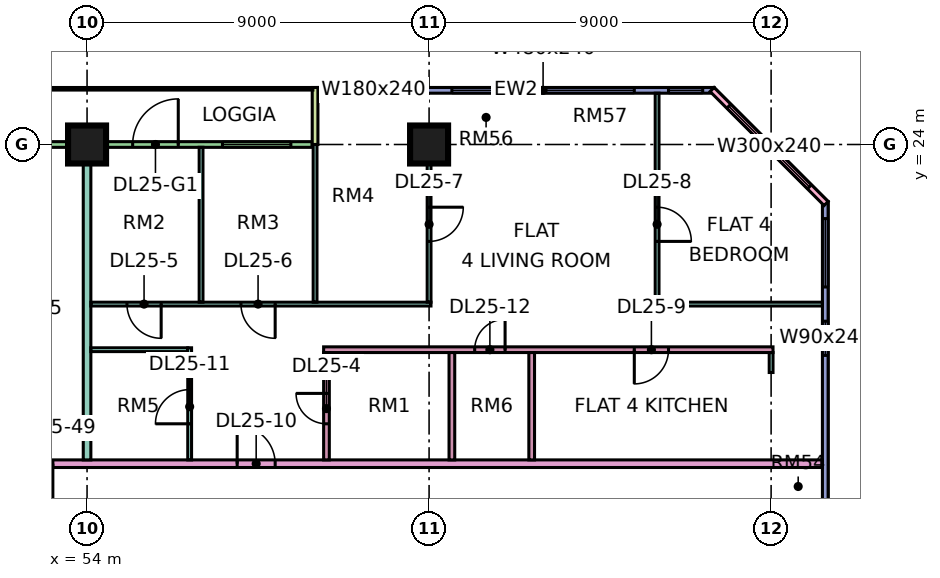
"""IFC4 building model, lengths in metres.
Left out: names, types, materials, properties, quantities, classifications, styles, units other than length and angle.
Written with IfcOpenShell. Run it as: python <this file> out.ifc"""

import sys

from ifc_helpers import new_model, si_unit, direction, frame, frame_2d, origin, origin_2d, place, context, subcontext, project, spatial, rectangle, extrude, element, fill, save


model = new_model("IFC4")
c1 = context("Model", 3, precision=1e-05, world=origin(), true_north=direction((0.0, 1.0)))
c2 = subcontext(c1, "Body", "Model", "MODEL_VIEW")
j1 = project(units=[si_unit("LENGTHUNIT", "METRE"), si_unit("PLANEANGLEUNIT", "RADIAN")], contexts=[c1])
p1 = place(None, origin())
s1 = spatial("IfcSite", under=j1, at=p1, CompositionType="ELEMENT")
p2 = place(p1, origin())
s2 = spatial("IfcBuilding", under=s1, at=p2, CompositionType="ELEMENT")
p3 = place(p2, frame((0.0, 0.0, 110.65)))
s3 = spatial("IfcBuildingStorey", under=s2, at=p3, CompositionType="ELEMENT", Elevation=110.65)
for number, where, z_axis, x_axis in (
    (1, (54.0, 24.0, 0.0), (0.0, 0.0, 1.0), (1.0, 0.0, 0.0)),
    (2, (63.0, 24.0, 0.0), (0.0, 0.0, 1.0), (1.0, 0.0, 0.0)),
):
    element("IfcColumn", number, at=place(p3, frame(where, z_axis=z_axis, x_axis=x_axis)), inside=s3, PredefinedType="COLUMN", context=c2, shape_type="SweptSolid", body=[
        extrude(rectangle(XDim=1.0, YDim=1.0, at=origin_2d()), origin(), (0.0, 0.0, 1.0), 3.75),
    ])
p4 = place(p3, frame((70.5, 25.425, 0.0), z_axis=(0.0, 0.0, 1.0), x_axis=(-1.0, 0.0, 0.0)))
e3 = element("IfcWall", 3, at=p4, inside=s3, PredefinedType="SOLIDWALL", context=c2, shape_type="SweptSolid", body=[
    extrude(rectangle(XDim=10.425, YDim=0.15, at=frame_2d((5.212, 0.0))), origin(), (0.0, 0.0, 1.0), 3.35),
])
p5 = place(p4, frame((0.3, 0.0, 0.45)))
e4 = element("IfcOpeningElement", 4, at=p5, cuts=e3, PredefinedType="OPENING", context=c2, shape_type="SweptSolid", body=[
    extrude(rectangle(XDim=0.9, YDim=2.4, at=frame_2d((0.45, 1.2))), frame((0.0, 0.085, 0.0), z_axis=(0.0, -1.0, 0.0), x_axis=(1.0, 0.0, 0.0)), (0.0, 0.0, 1.0), 0.17),
])
p6 = place(p4, frame((2.1, 0.0, 0.45)))
e5 = element("IfcOpeningElement", 5, at=p6, cuts=e3, PredefinedType="OPENING", context=c2, shape_type="SweptSolid", body=[
    extrude(rectangle(XDim=4.8, YDim=2.4, at=frame_2d((2.4, 1.2))), frame((0.0, 0.085, 0.0), z_axis=(0.0, -1.0, 0.0), x_axis=(1.0, 0.0, 0.0)), (0.0, 0.0, 1.0), 0.17),
])
p7 = place(p4, frame((8.062, 0.0, 0.45)))
e6 = element("IfcOpeningElement", 6, at=p7, cuts=e3, PredefinedType="OPENING", context=c2, shape_type="SweptSolid", body=[
    extrude(rectangle(XDim=1.8, YDim=2.4, at=frame_2d((0.9, 1.2))), frame((0.0, 0.085, 0.0), z_axis=(0.0, -1.0, 0.0), x_axis=(1.0, 0.0, 0.0)), (0.0, 0.0, 1.0), 0.17),
])
p8 = place(p3, frame((59.925, 24.0, 0.0), z_axis=(0.0, 0.0, 1.0), x_axis=(-1.0, 0.0, 0.0)))
e7 = element("IfcWall", 7, at=p8, inside=s3, PredefinedType="SOLIDWALL", context=c2, shape_type="SweptSolid", body=[
    extrude(rectangle(XDim=11.85, YDim=0.15, at=frame_2d((5.925, 0.0))), origin(), (0.0, 0.0, 1.0), 3.35),
])
p9 = place(p8, frame((0.562, 0.0, 0.45)))
e8 = element("IfcOpeningElement", 8, at=p9, cuts=e7, PredefinedType="OPENING", context=c2, shape_type="SweptSolid", body=[
    extrude(rectangle(XDim=1.8, YDim=2.4, at=frame_2d((0.9, 1.2))), frame((0.0, 0.085, 0.0), z_axis=(0.0, -1.0, 0.0), x_axis=(1.0, 0.0, 0.0)), (0.0, 0.0, 1.0), 0.17),
])
p10 = place(p8, frame((3.525, 0.0, 0.0)))
e9 = element("IfcOpeningElement", 9, at=p10, cuts=e7, PredefinedType="OPENING", context=c2, shape_type="SweptSolid", body=[
    extrude(rectangle(XDim=1.2, YDim=2.4, at=frame_2d((0.6, 1.2))), frame((0.0, 0.085, 0.0), z_axis=(0.0, -1.0, 0.0), x_axis=(1.0, 0.0, 0.0)), (0.0, 0.0, 1.0), 0.17),
])
p11 = place(p8, frame((7.087, 0.0, 0.45)))
e10 = element("IfcOpeningElement", 10, at=p11, cuts=e7, PredefinedType="OPENING", context=c2, shape_type="SweptSolid", body=[
    extrude(rectangle(XDim=4.2, YDim=2.4, at=frame_2d((2.1, 1.2))), frame((0.0, 0.085, 0.0), z_axis=(0.0, -1.0, 0.0), x_axis=(1.0, 0.0, 0.0)), (0.0, 0.0, 1.0), 0.17),
])
p12 = place(p3, frame((60.0, 25.5, 0.0), z_axis=(0.0, 0.0, 1.0), x_axis=(0.0, -1.0, 0.0)))
e11 = element("IfcWall", 11, at=p12, inside=s3, PredefinedType="SOLIDWALL", context=c2, shape_type="SweptSolid", body=[
    extrude(rectangle(XDim=1.5, YDim=0.15, at=frame_2d((0.75, 0.0))), origin(), (0.0, 0.0, 1.0), 3.35),
])
p13 = place(p3, frame((73.425, 12.075, 0.0), z_axis=(0.0, 0.0, 1.0), x_axis=(0.0, 1.0, 0.0)))
e12 = element("IfcWall", 12, at=p13, inside=s3, PredefinedType="SOLIDWALL", context=c2, shape_type="SweptSolid", body=[
    extrude(rectangle(XDim=10.425, YDim=0.15, at=frame_2d((5.212, 0.0))), origin(), (0.0, 0.0, 1.0), 3.35),
])
p14 = place(p13, frame((6.375, 0.0, 0.45)))
e13 = element("IfcOpeningElement", 13, at=p14, cuts=e12, PredefinedType="OPENING", context=c2, shape_type="SweptSolid", body=[
    extrude(rectangle(XDim=0.9, YDim=2.4, at=frame_2d((0.45, 1.2))), frame((0.0, 0.085, 0.0), z_axis=(0.0, -1.0, 0.0), x_axis=(1.0, 0.0, 0.0)), (0.0, 0.0, 1.0), 0.17),
])
p15 = place(p13, frame((8.175, 0.0, 0.45)))
e14 = element("IfcOpeningElement", 14, at=p15, cuts=e12, PredefinedType="OPENING", context=c2, shape_type="SweptSolid", body=[
    extrude(rectangle(XDim=1.8, YDim=2.4, at=frame_2d((0.9, 1.2))), frame((0.0, 0.085, 0.0), z_axis=(0.0, -1.0, 0.0), x_axis=(1.0, 0.0, 0.0)), (0.0, 0.0, 1.0), 0.17),
])
p16 = place(p3, frame((73.447, 22.447, 0.0), z_axis=(0.0, 0.0, 1.0), x_axis=(-0.707106781187, 0.707106781187, 0.0)))
e15 = element("IfcWall", 15, at=p16, inside=s3, PredefinedType="SOLIDWALL", context=c2, shape_type="SweptSolid", body=[
    extrude(rectangle(XDim=4.243, YDim=0.15, at=frame_2d((2.121, 0.0))), origin(), (0.0, 0.0, 1.0), 3.35),
])
p17 = place(p16, frame((0.621, 0.0, 0.45)))
e16 = element("IfcOpeningElement", 16, at=p17, cuts=e15, PredefinedType="OPENING", context=c2, shape_type="SweptSolid", body=[
    extrude(rectangle(XDim=3.0, YDim=2.4, at=frame_2d((1.5, 1.2))), frame((0.0, 0.085, 0.0), z_axis=(0.0, -1.0, 0.0), x_axis=(1.0, 0.0, 0.0)), (0.0, 0.0, 1.0), 0.17),
])
p18 = place(p3, frame((51.225, 15.6, 0.0), z_axis=(0.0, 0.0, 1.0), x_axis=(1.0, 0.0, 0.0)))
e17 = element("IfcWall", 17, at=p18, inside=s3, PredefinedType="PARTITIONING", context=c2, shape_type="SweptSolid", body=[
    extrude(rectangle(XDim=22.125, YDim=0.2, at=frame_2d((11.062, 0.0))), origin(), (0.0, 0.0, 1.0), 3.35),
])
p19 = place(p18, frame((6.725, 0.0, 0.0)))
e18 = element("IfcOpeningElement", 18, at=p19, cuts=e17, PredefinedType="OPENING", context=c2, shape_type="SweptSolid", body=[
    extrude(rectangle(XDim=1.0, YDim=2.1, at=frame_2d((0.5, 1.05))), frame((0.0, 0.11, 0.0), z_axis=(0.0, -1.0, 0.0), x_axis=(1.0, 0.0, 0.0)), (0.0, 0.0, 1.0), 0.22),
])
p20 = place(p18, frame((0.875, 0.0, 0.0)))
e19 = element("IfcOpeningElement", 19, at=p20, cuts=e17, PredefinedType="OPENING", context=c2, shape_type="SweptSolid", body=[
    extrude(rectangle(XDim=1.0, YDim=2.1, at=frame_2d((0.5, 1.05))), frame((0.0, 0.11, 0.0), z_axis=(0.0, -1.0, 0.0), x_axis=(1.0, 0.0, 0.0)), (0.0, 0.0, 1.0), 0.22),
])
p21 = place(p3, frame((54.0, 15.7, 0.0), z_axis=(0.0, 0.0, 1.0), x_axis=(0.0, 1.0, 0.0)))
e20 = element("IfcWall", 20, at=p21, inside=s3, PredefinedType="PARTITIONING", context=c2, shape_type="SweptSolid", body=[
    extrude(rectangle(XDim=8.226, YDim=0.2, at=frame_2d((4.113, 0.0))), origin(), (0.0, 0.0, 1.0), 3.35),
])
p22 = place(p3, frame((54.1, 18.6, 0.0), z_axis=(0.0, 0.0, 1.0), x_axis=(1.0, 0.0, 0.0)))
e21 = element("IfcWall", 21, at=p22, inside=s3, PredefinedType="PARTITIONING", context=c2, shape_type="SweptSolid", body=[
    extrude(rectangle(XDim=2.55, YDim=0.1, at=frame_2d((1.275, 0.0))), origin(), (0.0, 0.0, 1.0), 3.35),
])
p23 = place(p3, frame((54.1, 19.8, 0.0), z_axis=(0.0, 0.0, 1.0), x_axis=(1.0, 0.0, 0.0)))
e22 = element("IfcWall", 22, at=p23, inside=s3, PredefinedType="PARTITIONING", context=c2, shape_type="SweptSolid", body=[
    extrude(rectangle(XDim=8.95, YDim=0.1, at=frame_2d((4.475, 0.0))), origin(), (0.0, 0.0, 1.0), 3.35),
])
p24 = place(p23, frame((0.95, 0.0, 0.0)))
e23 = element("IfcOpeningElement", 23, at=p24, cuts=e22, PredefinedType="OPENING", context=c2, shape_type="SweptSolid", body=[
    extrude(rectangle(XDim=0.9, YDim=2.1, at=frame_2d((0.45, 1.05))), frame((0.0, 0.06, 0.0), z_axis=(0.0, -1.0, 0.0), x_axis=(1.0, 0.0, 0.0)), (0.0, 0.0, 1.0), 0.12),
])
p25 = place(p23, frame((3.95, 0.0, 0.0)))
e24 = element("IfcOpeningElement", 24, at=p25, cuts=e22, PredefinedType="OPENING", context=c2, shape_type="SweptSolid", body=[
    extrude(rectangle(XDim=0.9, YDim=2.1, at=frame_2d((0.45, 1.05))), frame((0.0, 0.06, 0.0), z_axis=(0.0, -1.0, 0.0), x_axis=(1.0, 0.0, 0.0)), (0.0, 0.0, 1.0), 0.12),
])
p26 = place(p3, frame((56.7, 15.7, 0.0), z_axis=(0.0, 0.0, 1.0), x_axis=(0.0, 1.0, 0.0)))
e25 = element("IfcWall", 25, at=p26, inside=s3, PredefinedType="PARTITIONING", context=c2, shape_type="SweptSolid", body=[
    extrude(rectangle(XDim=2.95, YDim=0.1, at=frame_2d((1.475, 0.0))), origin(), (0.0, 0.0, 1.0), 3.35),
])
p27 = place(p26, frame((0.95, 0.0, 0.0)))
e26 = element("IfcOpeningElement", 26, at=p27, cuts=e25, PredefinedType="OPENING", context=c2, shape_type="SweptSolid", body=[
    extrude(rectangle(XDim=0.9, YDim=2.1, at=frame_2d((0.45, 1.05))), frame((0.0, 0.06, 0.0), z_axis=(0.0, -1.0, 0.0), x_axis=(1.0, 0.0, 0.0)), (0.0, 0.0, 1.0), 0.12),
])
p28 = place(p3, frame((57.0, 19.85, 0.0), z_axis=(0.0, 0.0, 1.0), x_axis=(0.0, 1.0, 0.0)))
e27 = element("IfcWall", 27, at=p28, inside=s3, PredefinedType="PARTITIONING", context=c2, shape_type="SweptSolid", body=[
    extrude(rectangle(XDim=4.076, YDim=0.1, at=frame_2d((2.038, 0.0))), origin(), (0.0, 0.0, 1.0), 3.35),
])
p29 = place(p3, frame((60.0, 19.85, 0.0), z_axis=(0.0, 0.0, 1.0), x_axis=(0.0, 1.0, 0.0)))
e28 = element("IfcWall", 28, at=p29, inside=s3, PredefinedType="PARTITIONING", context=c2, shape_type="SweptSolid", body=[
    extrude(rectangle(XDim=4.15, YDim=0.1, at=frame_2d((2.075, 0.0))), origin(), (0.0, 0.0, 1.0), 3.35),
])
p30 = place(p3, frame((60.225, 18.6, 0.0), z_axis=(0.0, 0.0, 1.0), x_axis=(1.0, 0.0, 0.0)))
e29 = element("IfcWall", 29, at=p30, inside=s3, PredefinedType="PARTITIONING", context=c2, shape_type="SweptSolid", body=[
    extrude(rectangle(XDim=11.825, YDim=0.15, at=frame_2d((5.913, 0.0))), origin(), (0.0, 0.0, 1.0), 3.35),
])
p31 = place(p30, frame((8.175, 0.0, 0.0)))
e30 = element("IfcOpeningElement", 30, at=p31, cuts=e29, PredefinedType="OPENING", context=c2, shape_type="SweptSolid", body=[
    extrude(rectangle(XDim=0.9, YDim=2.1, at=frame_2d((0.45, 1.05))), frame((0.0, 0.085, 0.0), z_axis=(0.0, -1.0, 0.0), x_axis=(1.0, 0.0, 0.0)), (0.0, 0.0, 1.0), 0.17),
])
p32 = place(p30, frame((3.975, 0.0, 0.0)))
e31 = element("IfcOpeningElement", 31, at=p32, cuts=e29, PredefinedType="OPENING", context=c2, shape_type="SweptSolid", body=[
    extrude(rectangle(XDim=0.8, YDim=2.1, at=frame_2d((0.4, 1.05))), frame((0.0, 0.085, 0.0), z_axis=(0.0, -1.0, 0.0), x_axis=(1.0, 0.0, 0.0)), (0.0, 0.0, 1.0), 0.17),
])
p33 = place(p3, frame((60.3, 15.7, 0.0), z_axis=(0.0, 0.0, 1.0), x_axis=(0.0, 1.0, 0.0)))
e32 = element("IfcWall", 32, at=p33, inside=s3, PredefinedType="PARTITIONING", context=c2, shape_type="SweptSolid", body=[
    extrude(rectangle(XDim=2.825, YDim=0.15, at=frame_2d((1.413, 0.0))), origin(), (0.0, 0.0, 1.0), 3.35),
])
p34 = place(p33, frame((0.95, 0.0, 0.0)))
e33 = element("IfcOpeningElement", 33, at=p34, cuts=e32, PredefinedType="OPENING", context=c2, shape_type="SweptSolid", body=[
    extrude(rectangle(XDim=0.8, YDim=2.1, at=frame_2d((0.4, 1.05))), frame((0.0, 0.085, 0.0), z_axis=(0.0, -1.0, 0.0), x_axis=(1.0, 0.0, 0.0)), (0.0, 0.0, 1.0), 0.17),
])
p35 = place(p3, frame((63.0, 19.85, 0.0), z_axis=(0.0, 0.0, 1.0), x_axis=(0.0, 1.0, 0.0)))
e34 = element("IfcWall", 34, at=p35, inside=s3, PredefinedType="PARTITIONING", context=c2, shape_type="SweptSolid", body=[
    extrude(rectangle(XDim=4.15, YDim=0.1, at=frame_2d((2.075, 0.0))), origin(), (0.0, 0.0, 1.0), 3.35),
])
p36 = place(p35, frame((1.6, 0.0, 0.0)))
e35 = element("IfcOpeningElement", 35, at=p36, cuts=e34, PredefinedType="OPENING", context=c2, shape_type="SweptSolid", body=[
    extrude(rectangle(XDim=0.9, YDim=2.1, at=frame_2d((0.45, 1.05))), frame((0.0, 0.06, 0.0), z_axis=(0.0, -1.0, 0.0), x_axis=(1.0, 0.0, 0.0)), (0.0, 0.0, 1.0), 0.12),
])
for number, where, z_axis, x_axis in (
    (36, (63.6, 15.7, 0.0), (0.0, 0.0, 1.0), (0.0, 1.0, 0.0)),
    (37, (65.7, 15.7, 0.0), (0.0, 0.0, 1.0), (0.0, 1.0, 0.0)),
):
    element("IfcWall", number, at=place(p3, frame(where, z_axis=z_axis, x_axis=x_axis)), inside=s3, PredefinedType="PARTITIONING", context=c2, shape_type="SweptSolid", body=[
        extrude(rectangle(XDim=2.825, YDim=0.15, at=frame_2d((1.413, 0.0))), origin(), (0.0, 0.0, 1.0), 3.35),
    ])
p37 = place(p3, frame((68.95, 19.8, 0.0), z_axis=(0.0, 0.0, 1.0), x_axis=(1.0, 0.0, 0.0)))
e38 = element("IfcWall", 38, at=p37, inside=s3, PredefinedType="PARTITIONING", context=c2, shape_type="SweptSolid", body=[
    extrude(rectangle(XDim=4.401, YDim=0.1, at=frame_2d((2.201, 0.0))), origin(), (0.0, 0.0, 1.0), 3.35),
])
p38 = place(p3, frame((69.0, 19.85, 0.0), z_axis=(0.0, 0.0, 1.0), x_axis=(0.0, 1.0, 0.0)))
e39 = element("IfcWall", 39, at=p38, inside=s3, PredefinedType="PARTITIONING", context=c2, shape_type="SweptSolid", body=[
    extrude(rectangle(XDim=5.5, YDim=0.1, at=frame_2d((2.75, 0.0))), origin(), (0.0, 0.0, 1.0), 3.35),
])
p39 = place(p38, frame((1.6, 0.0, 0.0)))
e40 = element("IfcOpeningElement", 40, at=p39, cuts=e39, PredefinedType="OPENING", context=c2, shape_type="SweptSolid", body=[
    extrude(rectangle(XDim=0.9, YDim=2.1, at=frame_2d((0.45, 1.05))), frame((0.0, 0.06, 0.0), z_axis=(0.0, -1.0, 0.0), x_axis=(1.0, 0.0, 0.0)), (0.0, 0.0, 1.0), 0.12),
])
p40 = place(p3, frame((72.0, 18.0, 0.0), z_axis=(0.0, 0.0, 1.0), x_axis=(0.0, 1.0, 0.0)))
e41 = element("IfcWall", 41, at=p40, inside=s3, PredefinedType="PARTITIONING", context=c2, shape_type="SweptSolid", body=[
    extrude(rectangle(XDim=0.525, YDim=0.1, at=frame_2d((0.262, 0.0))), origin(), (0.0, 0.0, 1.0), 3.35),
])
p41 = place(p5, origin())
e42 = element("IfcWindow", 42, at=p41, inside=s3, PartitioningType="SINGLE_PANEL", PredefinedType="WINDOW", context=c2, shape_type="SweptSolid", body=[
    extrude(rectangle(XDim=0.9, YDim=2.4, at=frame_2d((0.45, 1.2))), frame((0.0, 0.03, 0.0), z_axis=(0.0, -1.0, 0.0), x_axis=(1.0, 0.0, 0.0)), (0.0, 0.0, 1.0), 0.06),
])
fill(e4, e42)
p42 = place(p6, origin())
e43 = element("IfcWindow", 43, at=p42, inside=s3, PartitioningType="SINGLE_PANEL", PredefinedType="WINDOW", context=c2, shape_type="SweptSolid", body=[
    extrude(rectangle(XDim=4.8, YDim=2.4, at=frame_2d((2.4, 1.2))), frame((0.0, 0.03, 0.0), z_axis=(0.0, -1.0, 0.0), x_axis=(1.0, 0.0, 0.0)), (0.0, 0.0, 1.0), 0.06),
])
fill(e5, e43)
p43 = place(p7, origin())
e44 = element("IfcWindow", 44, at=p43, inside=s3, PartitioningType="SINGLE_PANEL", PredefinedType="WINDOW", context=c2, shape_type="SweptSolid", body=[
    extrude(rectangle(XDim=1.8, YDim=2.4, at=frame_2d((0.9, 1.2))), frame((0.0, 0.03, 0.0), z_axis=(0.0, -1.0, 0.0), x_axis=(1.0, 0.0, 0.0)), (0.0, 0.0, 1.0), 0.06),
])
fill(e6, e44)
p44 = place(p9, origin())
e45 = element("IfcWindow", 45, at=p44, inside=s3, PartitioningType="SINGLE_PANEL", PredefinedType="WINDOW", context=c2, shape_type="SweptSolid", body=[
    extrude(rectangle(XDim=1.8, YDim=2.4, at=frame_2d((0.9, 1.2))), frame((0.0, 0.03, 0.0), z_axis=(0.0, -1.0, 0.0), x_axis=(1.0, 0.0, 0.0)), (0.0, 0.0, 1.0), 0.06),
])
fill(e8, e45)
p45 = place(p10, frame((1.2, 0.0, 0.0), z_axis=(0.0, 0.0, 1.0), x_axis=(-1.0, 0.0, 0.0)))
e46 = element("IfcDoor", 46, at=p45, inside=s3, OperationType="DOUBLE_DOOR_SINGLE_SWING", PredefinedType="DOOR", context=c2, shape_type="SweptSolid", body=[
    extrude(rectangle(XDim=1.2, YDim=2.4, at=frame_2d((0.6, 1.2))), frame((0.0, 0.025, 0.0), z_axis=(0.0, -1.0, 0.0), x_axis=(1.0, 0.0, 0.0)), (0.0, 0.0, 1.0), 0.05),
])
fill(e9, e46)
p46 = place(p14, origin())
e47 = element("IfcWindow", 47, at=p46, inside=s3, PartitioningType="SINGLE_PANEL", PredefinedType="WINDOW", context=c2, shape_type="SweptSolid", body=[
    extrude(rectangle(XDim=0.9, YDim=2.4, at=frame_2d((0.45, 1.2))), frame((0.0, 0.03, 0.0), z_axis=(0.0, -1.0, 0.0), x_axis=(1.0, 0.0, 0.0)), (0.0, 0.0, 1.0), 0.06),
])
fill(e13, e47)
p47 = place(p15, origin())
e48 = element("IfcWindow", 48, at=p47, inside=s3, PartitioningType="SINGLE_PANEL", PredefinedType="WINDOW", context=c2, shape_type="SweptSolid", body=[
    extrude(rectangle(XDim=1.8, YDim=2.4, at=frame_2d((0.9, 1.2))), frame((0.0, 0.03, 0.0), z_axis=(0.0, -1.0, 0.0), x_axis=(1.0, 0.0, 0.0)), (0.0, 0.0, 1.0), 0.06),
])
fill(e14, e48)
p48 = place(p17, origin())
e49 = element("IfcWindow", 49, at=p48, inside=s3, PartitioningType="SINGLE_PANEL", PredefinedType="WINDOW", context=c2, shape_type="SweptSolid", body=[
    extrude(rectangle(XDim=3.0, YDim=2.4, at=frame_2d((1.5, 1.2))), frame((0.0, 0.03, 0.0), z_axis=(0.0, -1.0, 0.0), x_axis=(1.0, 0.0, 0.0)), (0.0, 0.0, 1.0), 0.06),
])
fill(e16, e49)
p49 = place(p34, frame((0.8, 0.0, 0.0), z_axis=(0.0, 0.0, 1.0), x_axis=(-1.0, 0.0, 0.0)))
e50 = element("IfcDoor", 50, at=p49, inside=s3, OperationType="SINGLE_SWING_RIGHT", PredefinedType="DOOR", context=c2, shape_type="SweptSolid", body=[
    extrude(rectangle(XDim=0.8, YDim=2.1, at=frame_2d((0.4, 1.05))), frame((0.0, 0.025, 0.0), z_axis=(0.0, -1.0, 0.0), x_axis=(1.0, 0.0, 0.0)), (0.0, 0.0, 1.0), 0.05),
])
fill(e33, e50)
p50 = place(p24, origin())
e51 = element("IfcDoor", 51, at=p50, inside=s3, OperationType="SINGLE_SWING_RIGHT", PredefinedType="DOOR", context=c2, shape_type="SweptSolid", body=[
    extrude(rectangle(XDim=0.9, YDim=2.1, at=frame_2d((0.45, 1.05))), frame((0.0, 0.025, 0.0), z_axis=(0.0, -1.0, 0.0), x_axis=(1.0, 0.0, 0.0)), (0.0, 0.0, 1.0), 0.05),
])
fill(e23, e51)
p51 = place(p25, origin())
e52 = element("IfcDoor", 52, at=p51, inside=s3, OperationType="SINGLE_SWING_RIGHT", PredefinedType="DOOR", context=c2, shape_type="SweptSolid", body=[
    extrude(rectangle(XDim=0.9, YDim=2.1, at=frame_2d((0.45, 1.05))), frame((0.0, 0.025, 0.0), z_axis=(0.0, -1.0, 0.0), x_axis=(1.0, 0.0, 0.0)), (0.0, 0.0, 1.0), 0.05),
])
fill(e24, e52)
p52 = place(p36, origin())
e53 = element("IfcDoor", 53, at=p52, inside=s3, OperationType="SINGLE_SWING_RIGHT", PredefinedType="DOOR", context=c2, shape_type="SweptSolid", body=[
    extrude(rectangle(XDim=0.9, YDim=2.1, at=frame_2d((0.45, 1.05))), frame((0.0, 0.025, 0.0), z_axis=(0.0, -1.0, 0.0), x_axis=(1.0, 0.0, 0.0)), (0.0, 0.0, 1.0), 0.05),
])
fill(e35, e53)
p53 = place(p39, frame((0.9, 0.0, 0.0), z_axis=(0.0, 0.0, 1.0), x_axis=(-1.0, 0.0, 0.0)))
e54 = element("IfcDoor", 54, at=p53, inside=s3, OperationType="SINGLE_SWING_LEFT", PredefinedType="DOOR", context=c2, shape_type="SweptSolid", body=[
    extrude(rectangle(XDim=0.9, YDim=2.1, at=frame_2d((0.45, 1.05))), frame((0.0, 0.025, 0.0), z_axis=(0.0, -1.0, 0.0), x_axis=(1.0, 0.0, 0.0)), (0.0, 0.0, 1.0), 0.05),
])
fill(e40, e54)
p54 = place(p31, frame((0.9, 0.0, 0.0), z_axis=(0.0, 0.0, 1.0), x_axis=(-1.0, 0.0, 0.0)))
e55 = element("IfcDoor", 55, at=p54, inside=s3, OperationType="SINGLE_SWING_LEFT", PredefinedType="DOOR", context=c2, shape_type="SweptSolid", body=[
    extrude(rectangle(XDim=0.9, YDim=2.1, at=frame_2d((0.45, 1.05))), frame((0.0, 0.025, 0.0), z_axis=(0.0, -1.0, 0.0), x_axis=(1.0, 0.0, 0.0)), (0.0, 0.0, 1.0), 0.05),
])
fill(e30, e55)
p55 = place(p19, origin())
e56 = element("IfcDoor", 56, at=p55, inside=s3, OperationType="SINGLE_SWING_LEFT", PredefinedType="DOOR", context=c2, shape_type="SweptSolid", body=[
    extrude(rectangle(XDim=1.0, YDim=2.1, at=frame_2d((0.5, 1.05))), frame((0.0, 0.025, 0.0), z_axis=(0.0, -1.0, 0.0), x_axis=(1.0, 0.0, 0.0)), (0.0, 0.0, 1.0), 0.05),
])
fill(e18, e56)
p56 = place(p27, origin())
e57 = element("IfcDoor", 57, at=p56, inside=s3, OperationType="SINGLE_SWING_LEFT", PredefinedType="DOOR", context=c2, shape_type="SweptSolid", body=[
    extrude(rectangle(XDim=0.9, YDim=2.1, at=frame_2d((0.45, 1.05))), frame((0.0, 0.025, 0.0), z_axis=(0.0, -1.0, 0.0), x_axis=(1.0, 0.0, 0.0)), (0.0, 0.0, 1.0), 0.05),
])
fill(e26, e57)
p57 = place(p32, frame((0.8, 0.0, 0.0), z_axis=(0.0, 0.0, 1.0), x_axis=(-1.0, 0.0, 0.0)))
e58 = element("IfcDoor", 58, at=p57, inside=s3, OperationType="SINGLE_SWING_RIGHT", PredefinedType="DOOR", context=c2, shape_type="SweptSolid", body=[
    extrude(rectangle(XDim=0.8, YDim=2.1, at=frame_2d((0.4, 1.05))), frame((0.0, 0.025, 0.0), z_axis=(0.0, -1.0, 0.0), x_axis=(1.0, 0.0, 0.0)), (0.0, 0.0, 1.0), 0.05),
])
fill(e31, e58)
p58 = place(p20, origin())
e59 = element("IfcDoor", 59, at=p58, inside=s3, OperationType="SINGLE_SWING_RIGHT", PredefinedType="DOOR", context=c2, shape_type="SweptSolid", body=[
    extrude(rectangle(XDim=1.0, YDim=2.1, at=frame_2d((0.5, 1.05))), frame((0.0, 0.025, 0.0), z_axis=(0.0, -1.0, 0.0), x_axis=(1.0, 0.0, 0.0)), (0.0, 0.0, 1.0), 0.05),
])
fill(e19, e59)
save(model, sys.argv[1])
